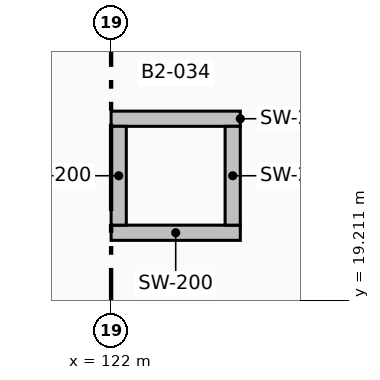
"""IFC4 building model, lengths in metres.
Left out: names, types, materials, properties, quantities, classifications, styles, units other than length and angle.
Written with IfcOpenShell. Run it as: python <this file> out.ifc"""

import sys

from ifc_helpers import new_model, si_unit, direction, frame, frame_2d, origin, place, context, subcontext, project, spatial, rectangle, extrude, element, save


model = new_model("IFC4")
c1 = context("Model", 3, precision=1e-05, world=origin(), true_north=direction((0.0, 1.0)))
c2 = subcontext(c1, "Body", "Model", "MODEL_VIEW")
j1 = project(units=[si_unit("LENGTHUNIT", "METRE"), si_unit("PLANEANGLEUNIT", "RADIAN")], contexts=[c1])
p1 = place(None, origin())
s1 = spatial("IfcSite", under=j1, at=p1, CompositionType="ELEMENT")
p2 = place(p1, origin())
s2 = spatial("IfcBuilding", under=s1, at=p2, CompositionType="ELEMENT")
p3 = place(p2, frame((0.0, 0.0, -9.6)))
s3 = spatial("IfcBuildingStorey", under=s2, at=p3, CompositionType="ELEMENT", Elevation=-9.6)
for number, where, z_axis, x_axis in (
    (1, (122.0, 20.1, 0.0), (0.0, 0.0, 1.0), (1.0, 0.0, 0.0)),
    (2, (123.7, 21.6, 0.0), (0.0, 0.0, 1.0), (-1.0, 0.0, 0.0)),
):
    element("IfcWall", number, at=place(p3, frame(where, z_axis=z_axis, x_axis=x_axis)), inside=s3, PredefinedType="PARTITIONING", context=c2, shape_type="SweptSolid", body=[
        extrude(rectangle(XDim=1.7, YDim=0.2, at=frame_2d((0.85, 0.0))), origin(), (0.0, 0.0, 1.0), 4.5),
    ])
p4 = place(p3, frame((122.1, 20.2, 0.0), z_axis=(0.0, 0.0, 1.0), x_axis=(0.0, 1.0, 0.0)))
e3 = element("IfcWall", 3, at=p4, inside=s3, PredefinedType="PARTITIONING", context=c2, shape_type="SweptSolid", body=[
    extrude(rectangle(XDim=1.3, YDim=0.2, at=frame_2d((0.65, 0.0))), origin(), (0.0, 0.0, 1.0), 3.742),
])
p5 = place(p3, frame((123.6, 21.5, 0.0), z_axis=(0.0, 0.0, 1.0), x_axis=(0.0, -1.0, 0.0)))
e4 = element("IfcWall", 4, at=p5, inside=s3, PredefinedType="PARTITIONING", context=c2, shape_type="SweptSolid", body=[
    extrude(rectangle(XDim=1.3, YDim=0.2, at=frame_2d((0.65, 0.0))), origin(), (0.0, 0.0, 1.0), 4.5),
])
save(model, sys.argv[1])
